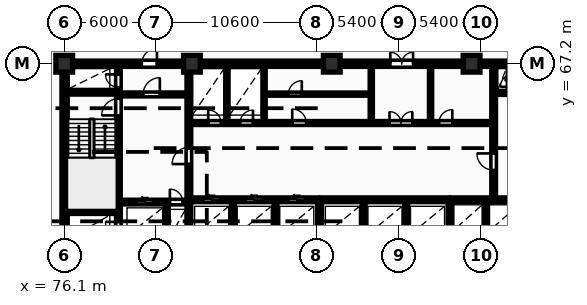
"""IFC4 building model, lengths in metres.
Left out: names, types, materials, properties, quantities, classifications, styles, units other than length and angle.
Written with IfcOpenShell. Run it as: python <this file> out.ifc"""

import sys

from ifc_helpers import new_model, si_unit, direction, frame, frame_2d, origin, origin_2d, place, context, subcontext, project, spatial, rectangle, extrude, element, fill, save


model = new_model("IFC4")
c1 = context("Model", 3, precision=1e-05, world=origin(), true_north=direction((0.0, 1.0)))
c2 = subcontext(c1, "Body", "Model", "MODEL_VIEW")
j1 = project(units=[si_unit("LENGTHUNIT", "METRE"), si_unit("PLANEANGLEUNIT", "RADIAN")], contexts=[c1])
p1 = place(None, origin())
s1 = spatial("IfcSite", under=j1, at=p1, CompositionType="ELEMENT")
p2 = place(p1, origin())
s2 = spatial("IfcBuilding", under=s1, at=p2, CompositionType="ELEMENT")
p3 = place(p2, frame((0.0, 0.0, -3.6)))
s3 = spatial("IfcBuildingStorey", under=s2, at=p3, CompositionType="ELEMENT", Elevation=-3.6)
for number, where, z_axis, x_axis in (
    (1, (76.1, 67.2, 0.0), (0.0, 0.0, 1.0), (1.0, 0.0, 0.0)),
    (2, (84.5, 67.2, 0.0), (0.0, 0.0, 1.0), (1.0, 0.0, 0.0)),
    (3, (93.7, 67.2, 0.0), (0.0, 0.0, 1.0), (1.0, 0.0, 0.0)),
    (4, (102.9, 67.2, 0.0), (0.0, 0.0, 1.0), (1.0, 0.0, 0.0)),
):
    element("IfcColumn", number, at=place(p3, frame(where, z_axis=z_axis, x_axis=x_axis)), inside=s3, PredefinedType="COLUMN", context=c2, shape_type="SweptSolid", body=[
        extrude(rectangle(XDim=1.1, YDim=1.1, at=origin_2d()), origin(), (0.0, 0.0, 1.0), 3.6),
    ])
p4 = place(p3, frame((76.125, 55.375, 0.0), z_axis=(0.0, 0.0, 1.0), x_axis=(0.0, 1.0, 0.0)))
e5 = element("IfcWall", 5, at=p4, inside=s3, PredefinedType="SHEAR", context=c2, shape_type="SweptSolid", body=[
    extrude(rectangle(XDim=11.65, YDim=0.35, at=frame_2d((5.825, 0.0))), origin(), (0.0, 0.0, 1.0), 3.6),
])
p5 = place(p3, frame((75.95, 67.2, 0.0), z_axis=(0.0, 0.0, 1.0), x_axis=(1.0, 0.0, 0.0)))
e6 = element("IfcWall", 6, at=p5, inside=s3, PredefinedType="SHEAR", context=c2, shape_type="SweptSolid", body=[
    extrude(rectangle(XDim=36.3, YDim=0.35, at=frame_2d((18.15, 0.0))), origin(), (0.0, 0.0, 1.0), 3.6),
])
p6 = place(p5, frame((5.25, 0.0, 0.0)))
e7 = element("IfcOpeningElement", 7, at=p6, cuts=e6, PredefinedType="OPENING", context=c2, shape_type="SweptSolid", body=[
    extrude(rectangle(XDim=1.0, YDim=2.15, at=frame_2d((0.5, 1.075))), frame((0.0, 0.185, 0.0), z_axis=(0.0, -1.0, 0.0), x_axis=(1.0, 0.0, 0.0)), (0.0, 0.0, 1.0), 0.37),
])
p7 = place(p5, frame((21.6, 0.0, 0.0)))
e8 = element("IfcOpeningElement", 8, at=p7, cuts=e6, PredefinedType="OPENING", context=c2, shape_type="SweptSolid", body=[
    extrude(rectangle(XDim=1.5, YDim=2.2, at=frame_2d((0.75, 1.1))), frame((0.0, 0.185, 0.0), z_axis=(0.0, -1.0, 0.0), x_axis=(1.0, 0.0, 0.0)), (0.0, 0.0, 1.0), 0.37),
])
p8 = place(p5, frame((30.45, 0.0, 0.0)))
e9 = element("IfcOpeningElement", 9, at=p8, cuts=e6, PredefinedType="OPENING", context=c2, shape_type="SweptSolid", body=[
    extrude(rectangle(XDim=1.0, YDim=2.15, at=frame_2d((0.5, 1.075))), frame((0.0, 0.185, 0.0), z_axis=(0.0, -1.0, 0.0), x_axis=(1.0, 0.0, 0.0)), (0.0, 0.0, 1.0), 0.37),
])
p9 = place(p3, frame((79.665, 55.4, 0.0), z_axis=(0.0, 0.0, 1.0), x_axis=(0.0, 1.0, 0.0)))
e10 = element("IfcWall", 10, at=p9, inside=s3, PredefinedType="SHEAR", context=c2, shape_type="SweptSolid", body=[
    extrude(rectangle(XDim=11.6, YDim=0.25, at=frame_2d((5.8, 0.0))), origin(), (0.0, 0.0, 1.0), 3.6),
])
p10 = place(p9, frame((0.55, 0.0, 0.0)))
e11 = element("IfcOpeningElement", 11, at=p10, cuts=e10, PredefinedType="OPENING", context=c2, shape_type="SweptSolid", body=[
    extrude(rectangle(XDim=0.85, YDim=2.05, at=frame_2d((0.425, 1.025))), frame((0.0, 0.135, 0.0), z_axis=(0.0, -1.0, 0.0), x_axis=(1.0, 0.0, 0.0)), (0.0, 0.0, 1.0), 0.27),
])
p11 = place(p9, frame((8.4, 0.0, 0.0)))
e12 = element("IfcOpeningElement", 12, at=p11, cuts=e10, PredefinedType="OPENING", context=c2, shape_type="SweptSolid", body=[
    extrude(rectangle(XDim=1.1, YDim=2.1, at=frame_2d((0.55, 1.05))), frame((0.0, 0.135, 0.0), z_axis=(0.0, -1.0, 0.0), x_axis=(1.0, 0.0, 0.0)), (0.0, 0.0, 1.0), 0.27),
])
p12 = place(p9, frame((10.25, 0.0, 0.0)))
e13 = element("IfcOpeningElement", 13, at=p12, cuts=e10, PredefinedType="OPENING", context=c2, shape_type="SweptSolid", body=[
    extrude(rectangle(XDim=0.85, YDim=2.05, at=frame_2d((0.425, 1.025))), frame((0.0, 0.135, 0.0), z_axis=(0.0, -1.0, 0.0), x_axis=(1.0, 0.0, 0.0)), (0.0, 0.0, 1.0), 0.27),
])
for number, where, z_axis, x_axis in (
    (14, (76.3, 57.475, 0.0), (0.0, 0.0, 1.0), (1.0, 0.0, 0.0)),
    (15, (76.3, 65.325, 0.0), (0.0, 0.0, 1.0), (1.0, 0.0, 0.0)),
):
    element("IfcWall", number, at=place(p3, frame(where, z_axis=z_axis, x_axis=x_axis)), inside=s3, PredefinedType="SHEAR", context=c2, shape_type="SweptSolid", body=[
        extrude(rectangle(XDim=3.24, YDim=0.25, at=frame_2d((1.62, 0.0))), origin(), (0.0, 0.0, 1.0), 3.6),
    ])
p13 = place(p3, frame((79.79, 58.1, 0.0), z_axis=(0.0, 0.0, 1.0), x_axis=(1.0, 0.0, 0.0)))
e16 = element("IfcWall", 16, at=p13, inside=s3, PredefinedType="SHEAR", context=c2, shape_type="SweptSolid", body=[
    extrude(rectangle(XDim=4.39, YDim=0.25, at=frame_2d((2.195, 0.0))), origin(), (0.0, 0.0, 1.0), 3.6),
])
p14 = place(p13, frame((1.05, 0.0, 0.0)))
e17 = element("IfcOpeningElement", 17, at=p14, cuts=e16, PredefinedType="OPENING", context=c2, shape_type="SweptSolid", body=[
    extrude(rectangle(XDim=1.12, YDim=2.12, at=frame_2d((0.56, 1.06))), frame((0.0, 0.135, 0.0), z_axis=(0.0, -1.0, 0.0), x_axis=(1.0, 0.0, 0.0)), (0.0, 0.0, 1.0), 0.27),
])
p15 = place(p13, frame((3.26, 0.0, 0.0)))
e18 = element("IfcOpeningElement", 18, at=p15, cuts=e16, PredefinedType="OPENING", context=c2, shape_type="SweptSolid", body=[
    extrude(rectangle(XDim=0.85, YDim=2.05, at=frame_2d((0.425, 1.025))), frame((0.0, 0.135, 0.0), z_axis=(0.0, -1.0, 0.0), x_axis=(1.0, 0.0, 0.0)), (0.0, 0.0, 1.0), 0.27),
])
p16 = place(p3, frame((82.85, 55.4, 0.0), z_axis=(0.0, 0.0, 1.0), x_axis=(0.0, 1.0, 0.0)))
e19 = element("IfcWall", 19, at=p16, inside=s3, PredefinedType="PARTITIONING", context=c2, shape_type="SweptSolid", body=[
    extrude(rectangle(XDim=2.56, YDim=0.2, at=frame_2d((1.28, 0.0))), origin(), (0.0, 0.0, 1.0), 3.3),
])
p17 = place(p3, frame((79.79, 65.18, 0.0), z_axis=(0.0, 0.0, 1.0), x_axis=(1.0, 0.0, 0.0)))
e20 = element("IfcWall", 20, at=p17, inside=s3, PredefinedType="PARTITIONING", context=c2, shape_type="SweptSolid", body=[
    extrude(rectangle(XDim=4.39, YDim=0.2, at=frame_2d((2.195, 0.0))), origin(), (0.0, 0.0, 1.0), 3.3),
])
p18 = place(p17, frame((1.5, 0.0, 0.0)))
e21 = element("IfcOpeningElement", 21, at=p18, cuts=e20, PredefinedType="OPENING", context=c2, shape_type="SweptSolid", body=[
    extrude(rectangle(XDim=1.1, YDim=2.1, at=frame_2d((0.55, 1.05))), frame((0.0, 0.11, 0.0), z_axis=(0.0, -1.0, 0.0), x_axis=(1.0, 0.0, 0.0)), (0.0, 0.0, 1.0), 0.22),
])
p19 = place(p3, frame((84.3, 55.4, 0.0), z_axis=(0.0, 0.0, 1.0), x_axis=(0.0, 1.0, 0.0)))
e22 = element("IfcWall", 22, at=p19, inside=s3, PredefinedType="SHEAR", context=c2, shape_type="SweptSolid", body=[
    extrude(rectangle(XDim=11.6, YDim=0.25, at=frame_2d((5.8, 0.0))), origin(), (0.0, 0.0, 1.0), 3.6),
])
p20 = place(p19, frame((5.2, 0.0, 0.0)))
e23 = element("IfcOpeningElement", 23, at=p20, cuts=e22, PredefinedType="OPENING", context=c2, shape_type="SweptSolid", body=[
    extrude(rectangle(XDim=1.1, YDim=2.1, at=frame_2d((0.55, 1.05))), frame((0.0, 0.135, 0.0), z_axis=(0.0, -1.0, 0.0), x_axis=(1.0, 0.0, 0.0)), (0.0, 0.0, 1.0), 0.27),
])
for number, where, z_axis, x_axis in (
    (24, (87.2, 55.4, 0.0), (0.0, 0.0, 1.0), (0.0, 1.0, 0.0)),
    (25, (90.0, 55.4, 0.0), (0.0, 0.0, 1.0), (0.0, 1.0, 0.0)),
):
    element("IfcWall", number, at=place(p3, frame(where, z_axis=z_axis, x_axis=x_axis)), inside=s3, PredefinedType="PARTITIONING", context=c2, shape_type="SweptSolid", body=[
        extrude(rectangle(XDim=2.72, YDim=0.2, at=frame_2d((1.36, 0.0))), origin(), (0.0, 0.0, 1.0), 3.3),
    ])
p21 = place(p3, frame((84.42, 58.25, 0.0), z_axis=(0.0, 0.0, 1.0), x_axis=(1.0, 0.0, 0.0)))
e26 = element("IfcWall", 26, at=p21, inside=s3, PredefinedType="SHEAR", context=c2, shape_type="SweptSolid", body=[
    extrude(rectangle(XDim=8.36, YDim=0.25, at=frame_2d((4.18, 0.0))), origin(), (0.0, 0.0, 1.0), 3.6),
])
p22 = place(p21, frame((0.82, 0.0, 0.0)))
e27 = element("IfcOpeningElement", 27, at=p22, cuts=e26, PredefinedType="OPENING", context=c2, shape_type="SweptSolid", body=[
    extrude(rectangle(XDim=1.12, YDim=2.12, at=frame_2d((0.56, 1.06))), frame((0.0, 0.135, 0.0), z_axis=(0.0, -1.0, 0.0), x_axis=(1.0, 0.0, 0.0)), (0.0, 0.0, 1.0), 0.27),
])
p23 = place(p21, frame((3.62, 0.0, 0.0)))
e28 = element("IfcOpeningElement", 28, at=p23, cuts=e26, PredefinedType="OPENING", context=c2, shape_type="SweptSolid", body=[
    extrude(rectangle(XDim=1.12, YDim=2.12, at=frame_2d((0.56, 1.06))), frame((0.0, 0.135, 0.0), z_axis=(0.0, -1.0, 0.0), x_axis=(1.0, 0.0, 0.0)), (0.0, 0.0, 1.0), 0.27),
])
p24 = place(p21, frame((6.42, 0.0, 0.0)))
e29 = element("IfcOpeningElement", 29, at=p24, cuts=e26, PredefinedType="OPENING", context=c2, shape_type="SweptSolid", body=[
    extrude(rectangle(XDim=1.12, YDim=2.12, at=frame_2d((0.56, 1.06))), frame((0.0, 0.135, 0.0), z_axis=(0.0, -1.0, 0.0), x_axis=(1.0, 0.0, 0.0)), (0.0, 0.0, 1.0), 0.27),
])
p25 = place(p3, frame((92.9, 55.4, 0.0), z_axis=(0.0, 0.0, 1.0), x_axis=(0.0, 1.0, 0.0)))
e30 = element("IfcWall", 30, at=p25, inside=s3, PredefinedType="SHEAR", context=c2, shape_type="SweptSolid", body=[
    extrude(rectangle(XDim=2.85, YDim=0.25, at=frame_2d((1.425, 0.0))), origin(), (0.0, 0.0, 1.0), 3.6),
])
for number, where, z_axis, x_axis in (
    (31, (95.8, 55.4, 0.0), (0.0, 0.0, 1.0), (0.0, 1.0, 0.0)),
    (32, (98.6, 55.4, 0.0), (0.0, 0.0, 1.0), (0.0, 1.0, 0.0)),
):
    element("IfcWall", number, at=place(p3, frame(where, z_axis=z_axis, x_axis=x_axis)), inside=s3, PredefinedType="PARTITIONING", context=c2, shape_type="SweptSolid", body=[
        extrude(rectangle(XDim=2.72, YDim=0.2, at=frame_2d((1.36, 0.0))), origin(), (0.0, 0.0, 1.0), 3.3),
    ])
p26 = place(p3, frame((93.02, 58.25, 0.0), z_axis=(0.0, 0.0, 1.0), x_axis=(1.0, 0.0, 0.0)))
e33 = element("IfcWall", 33, at=p26, inside=s3, PredefinedType="SHEAR", context=c2, shape_type="SweptSolid", body=[
    extrude(rectangle(XDim=8.36, YDim=0.25, at=frame_2d((4.18, 0.0))), origin(), (0.0, 0.0, 1.0), 3.6),
])
p27 = place(p3, frame((101.48, 55.4, 0.0), z_axis=(0.0, 0.0, 1.0), x_axis=(0.0, 1.0, 0.0)))
e34 = element("IfcWall", 34, at=p27, inside=s3, PredefinedType="SHEAR", context=c2, shape_type="SweptSolid", body=[
    extrude(rectangle(XDim=2.85, YDim=0.25, at=frame_2d((1.425, 0.0))), origin(), (0.0, 0.0, 1.0), 3.6),
])
p28 = place(p3, frame((103.85, 55.4, 0.0), z_axis=(0.0, 0.0, 1.0), x_axis=(0.0, 1.0, 0.0)))
e35 = element("IfcWall", 35, at=p28, inside=s3, PredefinedType="PARTITIONING", context=c2, shape_type="SweptSolid", body=[
    extrude(rectangle(XDim=2.72, YDim=0.2, at=frame_2d((1.36, 0.0))), origin(), (0.0, 0.0, 1.0), 3.3),
])
p29 = place(p3, frame((101.55, 58.25, 0.0), z_axis=(0.0, 0.0, 1.0), x_axis=(1.0, 0.0, 0.0)))
e36 = element("IfcWall", 36, at=p29, inside=s3, PredefinedType="SHEAR", context=c2, shape_type="SweptSolid", body=[
    extrude(rectangle(XDim=4.6, YDim=0.25, at=frame_2d((2.3, 0.0))), origin(), (0.0, 0.0, 1.0), 3.6),
])
for number, where, z_axis, x_axis in (
    (37, (86.8, 63.4, 0.0), (0.0, 0.0, 1.0), (0.0, 1.0, 0.0)),
    (38, (89.25, 63.4, 0.0), (0.0, 0.0, 1.0), (0.0, 1.0, 0.0)),
):
    element("IfcWall", number, at=place(p3, frame(where, z_axis=z_axis, x_axis=x_axis)), inside=s3, PredefinedType="PARTITIONING", context=c2, shape_type="SweptSolid", body=[
        extrude(rectangle(XDim=3.6, YDim=0.15, at=frame_2d((1.8, 0.0))), origin(), (0.0, 0.0, 1.0), 3.3),
    ])
p30 = place(p3, frame((89.25, 65.2, 0.0), z_axis=(0.0, 0.0, 1.0), x_axis=(1.0, 0.0, 0.0)))
e39 = element("IfcWall", 39, at=p30, inside=s3, PredefinedType="PARTITIONING", context=c2, shape_type="SweptSolid", body=[
    extrude(rectangle(XDim=7.05, YDim=0.15, at=frame_2d((3.525, 0.0))), origin(), (0.0, 0.0, 1.0), 3.3),
])
p31 = place(p30, frame((1.6, 0.0, 0.0)))
e40 = element("IfcOpeningElement", 40, at=p31, cuts=e39, PredefinedType="OPENING", context=c2, shape_type="SweptSolid", body=[
    extrude(rectangle(XDim=0.88, YDim=2.06, at=frame_2d((0.44, 1.03))), frame((0.0, 0.085, 0.0), z_axis=(0.0, -1.0, 0.0), x_axis=(1.0, 0.0, 0.0)), (0.0, 0.0, 1.0), 0.17),
])
for number, where, z_axis, x_axis in (
    (41, (96.3, 63.4, 0.0), (0.0, 0.0, 1.0), (0.0, 1.0, 0.0)),
    (42, (100.2, 63.4, 0.0), (0.0, 0.0, 1.0), (0.0, 1.0, 0.0)),
):
    element("IfcWall", number, at=place(p3, frame(where, z_axis=z_axis, x_axis=x_axis)), inside=s3, PredefinedType="PARTITIONING", context=c2, shape_type="SweptSolid", body=[
        extrude(rectangle(XDim=3.6, YDim=0.15, at=frame_2d((1.8, 0.0))), origin(), (0.0, 0.0, 1.0), 3.3),
    ])
p32 = place(p3, frame((84.42, 63.3, 0.0), z_axis=(0.0, 0.0, 1.0), x_axis=(1.0, 0.0, 0.0)))
e43 = element("IfcWall", 43, at=p32, inside=s3, PredefinedType="PARTITIONING", context=c2, shape_type="SweptSolid", body=[
    extrude(rectangle(XDim=19.83, YDim=0.2, at=frame_2d((9.915, 0.0))), origin(), (0.0, 0.0, 1.0), 3.3),
])
p33 = place(p32, frame((1.15, 0.0, 0.0)))
e44 = element("IfcOpeningElement", 44, at=p33, cuts=e43, PredefinedType="OPENING", context=c2, shape_type="SweptSolid", body=[
    extrude(rectangle(XDim=0.85, YDim=2.05, at=frame_2d((0.425, 1.025))), frame((0.0, 0.11, 0.0), z_axis=(0.0, -1.0, 0.0), x_axis=(1.0, 0.0, 0.0)), (0.0, 0.0, 1.0), 0.22),
])
p34 = place(p32, frame((3.25, 0.0, 0.0)))
e45 = element("IfcOpeningElement", 45, at=p34, cuts=e43, PredefinedType="OPENING", context=c2, shape_type="SweptSolid", body=[
    extrude(rectangle(XDim=0.85, YDim=2.05, at=frame_2d((0.425, 1.025))), frame((0.0, 0.11, 0.0), z_axis=(0.0, -1.0, 0.0), x_axis=(1.0, 0.0, 0.0)), (0.0, 0.0, 1.0), 0.22),
])
p35 = place(p32, frame((13.08, 0.0, 0.0)))
e46 = element("IfcOpeningElement", 46, at=p35, cuts=e43, PredefinedType="OPENING", context=c2, shape_type="SweptSolid", body=[
    extrude(rectangle(XDim=1.5, YDim=2.2, at=frame_2d((0.75, 1.1))), frame((0.0, 0.11, 0.0), z_axis=(0.0, -1.0, 0.0), x_axis=(1.0, 0.0, 0.0)), (0.0, 0.0, 1.0), 0.22),
])
p36 = place(p32, frame((6.68, 0.0, 0.0)))
e47 = element("IfcOpeningElement", 47, at=p36, cuts=e43, PredefinedType="OPENING", context=c2, shape_type="SweptSolid", body=[
    extrude(rectangle(XDim=0.92, YDim=2.08, at=frame_2d((0.46, 1.04))), frame((0.0, 0.11, 0.0), z_axis=(0.0, -1.0, 0.0), x_axis=(1.0, 0.0, 0.0)), (0.0, 0.0, 1.0), 0.22),
])
p37 = place(p32, frame((16.33, 0.0, 0.0)))
e48 = element("IfcOpeningElement", 48, at=p37, cuts=e43, PredefinedType="OPENING", context=c2, shape_type="SweptSolid", body=[
    extrude(rectangle(XDim=0.88, YDim=2.06, at=frame_2d((0.44, 1.03))), frame((0.0, 0.11, 0.0), z_axis=(0.0, -1.0, 0.0), x_axis=(1.0, 0.0, 0.0)), (0.0, 0.0, 1.0), 0.22),
])
p38 = place(p3, frame((104.45, 65.28, 0.0), z_axis=(0.0, 0.0, 1.0), x_axis=(1.0, 0.0, 0.0)))
e49 = element("IfcWall", 49, at=p38, inside=s3, PredefinedType="PARTITIONING", context=c2, shape_type="SweptSolid", body=[
    extrude(rectangle(XDim=1.2, YDim=0.2, at=frame_2d((0.6, 0.0))), origin(), (0.0, 0.0, 1.0), 3.3),
])
p39 = place(p3, frame((104.35, 58.4, 0.0), z_axis=(0.0, 0.0, 1.0), x_axis=(0.0, 1.0, 0.0)))
e50 = element("IfcWall", 50, at=p39, inside=s3, PredefinedType="SHEAR", context=c2, shape_type="SweptSolid", body=[
    extrude(rectangle(XDim=8.6, YDim=0.25, at=frame_2d((4.3, 0.0))), origin(), (0.0, 0.0, 1.0), 3.6),
])
p40 = place(p39, frame((1.8, 0.0, 0.0)))
e51 = element("IfcOpeningElement", 51, at=p40, cuts=e50, PredefinedType="OPENING", context=c2, shape_type="SweptSolid", body=[
    extrude(rectangle(XDim=1.1, YDim=2.1, at=frame_2d((0.55, 1.05))), frame((0.0, 0.135, 0.0), z_axis=(0.0, -1.0, 0.0), x_axis=(1.0, 0.0, 0.0)), (0.0, 0.0, 1.0), 0.27),
])
p41 = place(p6, origin())
e52 = element("IfcDoor", 52, at=p41, inside=s3, OperationType="SINGLE_SWING_RIGHT", PredefinedType="DOOR", context=c2, shape_type="SweptSolid", body=[
    extrude(rectangle(XDim=1.0, YDim=2.15, at=frame_2d((0.5, 1.075))), frame((0.0, 0.025, 0.0), z_axis=(0.0, -1.0, 0.0), x_axis=(1.0, 0.0, 0.0)), (0.0, 0.0, 1.0), 0.05),
])
fill(e7, e52)
p42 = place(p7, origin())
e53 = element("IfcDoor", 53, at=p42, inside=s3, OperationType="DOUBLE_DOOR_SINGLE_SWING", PredefinedType="DOOR", context=c2, shape_type="SweptSolid", body=[
    extrude(rectangle(XDim=1.5, YDim=2.2, at=frame_2d((0.75, 1.1))), frame((0.0, 0.025, 0.0), z_axis=(0.0, -1.0, 0.0), x_axis=(1.0, 0.0, 0.0)), (0.0, 0.0, 1.0), 0.05),
])
fill(e8, e53)
p43 = place(p10, origin())
e54 = element("IfcDoor", 54, at=p43, inside=s3, OperationType="SINGLE_SWING_RIGHT", PredefinedType="DOOR", context=c2, shape_type="SweptSolid", body=[
    extrude(rectangle(XDim=0.85, YDim=2.05, at=frame_2d((0.425, 1.025))), frame((0.0, 0.025, 0.0), z_axis=(0.0, -1.0, 0.0), x_axis=(1.0, 0.0, 0.0)), (0.0, 0.0, 1.0), 0.05),
])
fill(e11, e54)
p44 = place(p11, origin())
e55 = element("IfcDoor", 55, at=p44, inside=s3, OperationType="SINGLE_SWING_LEFT", PredefinedType="DOOR", context=c2, shape_type="SweptSolid", body=[
    extrude(rectangle(XDim=1.1, YDim=2.1, at=frame_2d((0.55, 1.05))), frame((0.0, 0.025, 0.0), z_axis=(0.0, -1.0, 0.0), x_axis=(1.0, 0.0, 0.0)), (0.0, 0.0, 1.0), 0.05),
])
fill(e12, e55)
p45 = place(p12, origin())
e56 = element("IfcDoor", 56, at=p45, inside=s3, OperationType="SINGLE_SWING_RIGHT", PredefinedType="DOOR", context=c2, shape_type="SweptSolid", body=[
    extrude(rectangle(XDim=0.85, YDim=2.05, at=frame_2d((0.425, 1.025))), frame((0.0, 0.025, 0.0), z_axis=(0.0, -1.0, 0.0), x_axis=(1.0, 0.0, 0.0)), (0.0, 0.0, 1.0), 0.05),
])
fill(e13, e56)
p46 = place(p14, origin())
e57 = element("IfcDoor", 57, at=p46, inside=s3, OperationType="SLIDING_TO_LEFT", PredefinedType="DOOR", context=c2, shape_type="SweptSolid", body=[
    extrude(rectangle(XDim=1.12, YDim=2.12, at=frame_2d((0.56, 1.06))), frame((0.0, 0.025, 0.0), z_axis=(0.0, -1.0, 0.0), x_axis=(1.0, 0.0, 0.0)), (0.0, 0.0, 1.0), 0.05),
])
fill(e17, e57)
p47 = place(p15, origin())
e58 = element("IfcDoor", 58, at=p47, inside=s3, OperationType="SINGLE_SWING_LEFT", PredefinedType="DOOR", context=c2, shape_type="SweptSolid", body=[
    extrude(rectangle(XDim=0.85, YDim=2.05, at=frame_2d((0.425, 1.025))), frame((0.0, 0.025, 0.0), z_axis=(0.0, -1.0, 0.0), x_axis=(1.0, 0.0, 0.0)), (0.0, 0.0, 1.0), 0.05),
])
fill(e18, e58)
p48 = place(p18, origin())
e59 = element("IfcDoor", 59, at=p48, inside=s3, OperationType="SINGLE_SWING_RIGHT", PredefinedType="DOOR", context=c2, shape_type="SweptSolid", body=[
    extrude(rectangle(XDim=1.1, YDim=2.1, at=frame_2d((0.55, 1.05))), frame((0.0, 0.025, 0.0), z_axis=(0.0, -1.0, 0.0), x_axis=(1.0, 0.0, 0.0)), (0.0, 0.0, 1.0), 0.05),
])
fill(e21, e59)
p49 = place(p20, origin())
e60 = element("IfcDoor", 60, at=p49, inside=s3, OperationType="SINGLE_SWING_LEFT", PredefinedType="DOOR", context=c2, shape_type="SweptSolid", body=[
    extrude(rectangle(XDim=1.1, YDim=2.1, at=frame_2d((0.55, 1.05))), frame((0.0, 0.025, 0.0), z_axis=(0.0, -1.0, 0.0), x_axis=(1.0, 0.0, 0.0)), (0.0, 0.0, 1.0), 0.05),
])
fill(e23, e60)
p50 = place(p22, origin())
e61 = element("IfcDoor", 61, at=p50, inside=s3, OperationType="SLIDING_TO_LEFT", PredefinedType="DOOR", context=c2, shape_type="SweptSolid", body=[
    extrude(rectangle(XDim=1.12, YDim=2.12, at=frame_2d((0.56, 1.06))), frame((0.0, 0.025, 0.0), z_axis=(0.0, -1.0, 0.0), x_axis=(1.0, 0.0, 0.0)), (0.0, 0.0, 1.0), 0.05),
])
fill(e27, e61)
p51 = place(p23, origin())
e62 = element("IfcDoor", 62, at=p51, inside=s3, OperationType="SLIDING_TO_LEFT", PredefinedType="DOOR", context=c2, shape_type="SweptSolid", body=[
    extrude(rectangle(XDim=1.12, YDim=2.12, at=frame_2d((0.56, 1.06))), frame((0.0, 0.025, 0.0), z_axis=(0.0, -1.0, 0.0), x_axis=(1.0, 0.0, 0.0)), (0.0, 0.0, 1.0), 0.05),
])
fill(e28, e62)
p52 = place(p24, origin())
e63 = element("IfcDoor", 63, at=p52, inside=s3, OperationType="SLIDING_TO_LEFT", PredefinedType="DOOR", context=c2, shape_type="SweptSolid", body=[
    extrude(rectangle(XDim=1.12, YDim=2.12, at=frame_2d((0.56, 1.06))), frame((0.0, 0.025, 0.0), z_axis=(0.0, -1.0, 0.0), x_axis=(1.0, 0.0, 0.0)), (0.0, 0.0, 1.0), 0.05),
])
fill(e29, e63)
p53 = place(p31, origin())
e64 = element("IfcDoor", 64, at=p53, inside=s3, OperationType="SINGLE_SWING_RIGHT", PredefinedType="DOOR", context=c2, shape_type="SweptSolid", body=[
    extrude(rectangle(XDim=0.88, YDim=2.06, at=frame_2d((0.44, 1.03))), frame((0.0, 0.025, 0.0), z_axis=(0.0, -1.0, 0.0), x_axis=(1.0, 0.0, 0.0)), (0.0, 0.0, 1.0), 0.05),
])
fill(e40, e64)
p54 = place(p33, origin())
e65 = element("IfcDoor", 65, at=p54, inside=s3, OperationType="SINGLE_SWING_LEFT", PredefinedType="DOOR", context=c2, shape_type="SweptSolid", body=[
    extrude(rectangle(XDim=0.85, YDim=2.05, at=frame_2d((0.425, 1.025))), frame((0.0, 0.025, 0.0), z_axis=(0.0, -1.0, 0.0), x_axis=(1.0, 0.0, 0.0)), (0.0, 0.0, 1.0), 0.05),
])
fill(e44, e65)
p55 = place(p34, origin())
e66 = element("IfcDoor", 66, at=p55, inside=s3, OperationType="SINGLE_SWING_RIGHT", PredefinedType="DOOR", context=c2, shape_type="SweptSolid", body=[
    extrude(rectangle(XDim=0.85, YDim=2.05, at=frame_2d((0.425, 1.025))), frame((0.0, 0.025, 0.0), z_axis=(0.0, -1.0, 0.0), x_axis=(1.0, 0.0, 0.0)), (0.0, 0.0, 1.0), 0.05),
])
fill(e45, e66)
p56 = place(p35, origin())
e67 = element("IfcDoor", 67, at=p56, inside=s3, OperationType="DOUBLE_DOOR_SINGLE_SWING", PredefinedType="DOOR", context=c2, shape_type="SweptSolid", body=[
    extrude(rectangle(XDim=1.5, YDim=2.2, at=frame_2d((0.75, 1.1))), frame((0.0, 0.025, 0.0), z_axis=(0.0, -1.0, 0.0), x_axis=(1.0, 0.0, 0.0)), (0.0, 0.0, 1.0), 0.05),
])
fill(e46, e67)
p57 = place(p36, origin())
e68 = element("IfcDoor", 68, at=p57, inside=s3, OperationType="SINGLE_SWING_LEFT", PredefinedType="DOOR", context=c2, shape_type="SweptSolid", body=[
    extrude(rectangle(XDim=0.92, YDim=2.08, at=frame_2d((0.46, 1.04))), frame((0.0, 0.025, 0.0), z_axis=(0.0, -1.0, 0.0), x_axis=(1.0, 0.0, 0.0)), (0.0, 0.0, 1.0), 0.05),
])
fill(e47, e68)
p58 = place(p37, origin())
e69 = element("IfcDoor", 69, at=p58, inside=s3, OperationType="SINGLE_SWING_RIGHT", PredefinedType="DOOR", context=c2, shape_type="SweptSolid", body=[
    extrude(rectangle(XDim=0.88, YDim=2.06, at=frame_2d((0.44, 1.03))), frame((0.0, 0.025, 0.0), z_axis=(0.0, -1.0, 0.0), x_axis=(1.0, 0.0, 0.0)), (0.0, 0.0, 1.0), 0.05),
])
fill(e48, e69)
p59 = place(p40, origin())
e70 = element("IfcDoor", 70, at=p59, inside=s3, OperationType="SINGLE_SWING_RIGHT", PredefinedType="DOOR", context=c2, shape_type="SweptSolid", body=[
    extrude(rectangle(XDim=1.1, YDim=2.1, at=frame_2d((0.55, 1.05))), frame((0.0, 0.025, 0.0), z_axis=(0.0, -1.0, 0.0), x_axis=(1.0, 0.0, 0.0)), (0.0, 0.0, 1.0), 0.05),
])
fill(e51, e70)
save(model, sys.argv[1])
